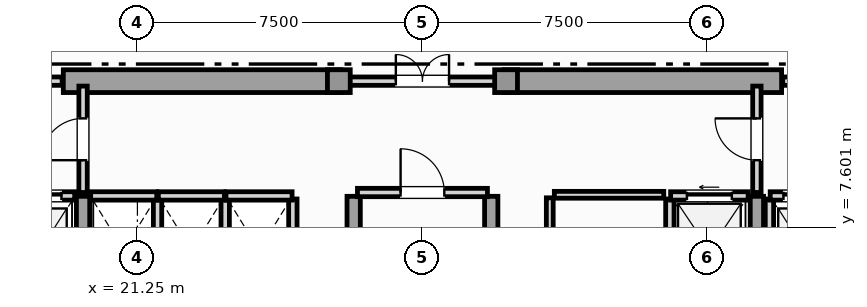
"""IFC4 building model, lengths in metres.
Left out: names, types, materials, properties, quantities, classifications, styles, units other than length and angle.
Written with IfcOpenShell. Run it as: python <this file> out.ifc"""

import sys

from ifc_helpers import new_model, si_unit, direction, frame, frame_2d, origin, origin_2d, place, context, subcontext, project, spatial, rectangle, extrude, element, fill, save


model = new_model("IFC4")
c1 = context("Model", 3, precision=1e-05, world=origin(), true_north=direction((0.0, 1.0)))
c2 = subcontext(c1, "Body", "Model", "MODEL_VIEW")
j1 = project(units=[si_unit("LENGTHUNIT", "METRE"), si_unit("PLANEANGLEUNIT", "RADIAN")], contexts=[c1])
p1 = place(None, origin())
s1 = spatial("IfcSite", under=j1, at=p1, CompositionType="ELEMENT")
p2 = place(p1, origin())
s2 = spatial("IfcBuilding", under=s1, at=p2, CompositionType="ELEMENT")
p3 = place(p2, frame((0.0, 0.0, 246.5)))
s3 = spatial("IfcBuildingStorey", under=s2, at=p3, CompositionType="ELEMENT", Elevation=246.5)
for number, where, z_axis, x_axis in (
    (1, (19.3, 11.45, 0.0), (0.0, 0.0, 1.0), (1.0, 0.0, 0.0)),
    (2, (30.9, 11.45, 0.0), (0.0, 0.0, 1.0), (1.0, 0.0, 0.0)),
):
    element("IfcWall", number, at=place(p3, frame(where, z_axis=z_axis, x_axis=x_axis)), inside=s3, PredefinedType="SHEAR", context=c2, shape_type="SweptSolid", body=[
        extrude(rectangle(XDim=7.3, YDim=0.6, at=frame_2d((3.65, 0.0))), origin(), (0.0, 0.0, 1.0), 4.92),
    ])
for number, where, z_axis, x_axis in (
    (3, (19.82, 0.92, 0.0), (0.0, 0.0, 1.0), (0.0, 1.0, 0.0)),
    (4, (26.94, 0.92, 0.0), (0.0, 0.0, 1.0), (0.0, 1.0, 0.0)),
    (5, (30.56, 0.92, 0.0), (0.0, 0.0, 1.0), (0.0, 1.0, 0.0)),
    (6, (37.55, 0.92, 0.0), (0.0, 0.0, 1.0), (0.0, 1.0, 0.0)),
):
    element("IfcWall", number, at=place(p3, frame(where, z_axis=z_axis, x_axis=x_axis)), inside=s3, PredefinedType="SHEAR", context=c2, shape_type="SweptSolid", body=[
        extrude(rectangle(XDim=7.5, YDim=0.35, at=frame_2d((3.75, 0.0))), origin(), (0.0, 0.0, 1.0), 4.92),
    ])
for number, where, z_axis, x_axis in (
    (7, (26.55, 11.45, 0.0), (0.0, 0.0, 1.0), (1.0, 0.0, 0.0)),
    (8, (30.95, 11.45, 0.0), (0.0, 0.0, 1.0), (1.0, 0.0, 0.0)),
):
    element("IfcColumn", number, at=place(p3, frame(where, z_axis=z_axis, x_axis=x_axis)), inside=s3, PredefinedType="COLUMN", context=c2, shape_type="SweptSolid", body=[
        extrude(rectangle(XDim=0.6, YDim=0.6, at=origin_2d()), origin(), (0.0, 0.0, 1.0), 5.2),
    ])
p4 = place(p3, frame((17.78, 8.43, 0.0), z_axis=(0.0, 0.0, 1.0), x_axis=(1.0, 0.0, 0.0)))
e9 = element("IfcWall", 9, at=p4, inside=s3, PredefinedType="SOLIDWALL", context=c2, shape_type="SweptSolid", body=[
    extrude(rectangle(XDim=1.82, YDim=0.22, at=frame_2d((0.91, 0.0))), origin(), (0.0, 0.0, 1.0), 4.92),
])
p5 = place(p4, frame((0.35, 0.0, 0.0)))
e10 = element("IfcOpeningElement", 10, at=p5, cuts=e9, PredefinedType="OPENING", context=c2, shape_type="SweptSolid", body=[
    extrude(rectangle(XDim=1.12, YDim=2.25, at=frame_2d((0.56, 1.125))), frame((0.0, 0.12, 0.0), z_axis=(0.0, -1.0, 0.0), x_axis=(1.0, 0.0, 0.0)), (0.0, 0.0, 1.0), 0.24),
])
p6 = place(p3, frame((37.88, 5.65, 0.0), z_axis=(0.0, 0.0, 1.0), x_axis=(0.0, 1.0, 0.0)))
e11 = element("IfcWall", 11, at=p6, inside=s3, PredefinedType="SOLIDWALL", context=c2, shape_type="SweptSolid", body=[
    extrude(rectangle(XDim=2.7, YDim=0.22, at=frame_2d((1.35, 0.0))), origin(), (0.0, 0.0, 1.0), 4.92),
])
p7 = place(p3, frame((37.9, 8.43, 0.0), z_axis=(0.0, 0.0, 1.0), x_axis=(1.0, 0.0, 0.0)))
e12 = element("IfcWall", 12, at=p7, inside=s3, PredefinedType="SOLIDWALL", context=c2, shape_type="SweptSolid", body=[
    extrude(rectangle(XDim=1.82, YDim=0.22, at=frame_2d((0.91, 0.0))), origin(), (0.0, 0.0, 1.0), 4.92),
])
p8 = place(p7, frame((0.35, 0.0, 0.0)))
e13 = element("IfcOpeningElement", 13, at=p8, cuts=e12, PredefinedType="OPENING", context=c2, shape_type="SweptSolid", body=[
    extrude(rectangle(XDim=1.12, YDim=2.25, at=frame_2d((0.56, 1.125))), frame((0.0, 0.12, 0.0), z_axis=(0.0, -1.0, 0.0), x_axis=(1.0, 0.0, 0.0)), (0.0, 0.0, 1.0), 0.24),
])
p9 = place(p3, frame((35.26, 5.65, 0.0), z_axis=(0.0, 0.0, 1.0), x_axis=(0.0, 1.0, 0.0)))
e14 = element("IfcWall", 14, at=p9, inside=s3, PredefinedType="SOLIDWALL", context=c2, shape_type="SweptSolid", body=[
    extrude(rectangle(XDim=2.7, YDim=0.22, at=frame_2d((1.35, 0.0))), origin(), (0.0, 0.0, 1.0), 4.92),
])
p10 = place(p3, frame((35.28, 8.43, 0.0), z_axis=(0.0, 0.0, 1.0), x_axis=(1.0, 0.0, 0.0)))
e15 = element("IfcWall", 15, at=p10, inside=s3, PredefinedType="SOLIDWALL", context=c2, shape_type="SweptSolid", body=[
    extrude(rectangle(XDim=2.04, YDim=0.22, at=frame_2d((1.02, 0.0))), origin(), (0.0, 0.0, 1.0), 4.92),
])
p11 = place(p10, frame((0.43, 0.0, 0.0)))
e16 = element("IfcOpeningElement", 16, at=p11, cuts=e15, PredefinedType="OPENING", context=c2, shape_type="SweptSolid", body=[
    extrude(rectangle(XDim=1.18, YDim=2.2, at=frame_2d((0.59, 1.1))), frame((0.0, 0.12, 0.0), z_axis=(0.0, -1.0, 0.0), x_axis=(1.0, 0.0, 0.0)), (0.0, 0.0, 1.0), 0.24),
])
p12 = place(p3, frame((21.78, 5.65, 0.0), z_axis=(0.0, 0.0, 1.0), x_axis=(0.0, 1.0, 0.0)))
e17 = element("IfcWall", 17, at=p12, inside=s3, PredefinedType="SOLIDWALL", context=c2, shape_type="SweptSolid", body=[
    extrude(rectangle(XDim=2.7, YDim=0.22, at=frame_2d((1.35, 0.0))), origin(), (0.0, 0.0, 1.0), 4.92),
])
p13 = place(p3, frame((20.02, 8.43, 0.0), z_axis=(0.0, 0.0, 1.0), x_axis=(1.0, 0.0, 0.0)))
e18 = element("IfcWall", 18, at=p13, inside=s3, PredefinedType="SOLIDWALL", context=c2, shape_type="SweptSolid", body=[
    extrude(rectangle(XDim=1.74, YDim=0.22, at=frame_2d((0.87, 0.0))), origin(), (0.0, 0.0, 1.0), 4.92),
])
p14 = place(p3, frame((23.56, 5.65, 0.0), z_axis=(0.0, 0.0, 1.0), x_axis=(0.0, 1.0, 0.0)))
e19 = element("IfcWall", 19, at=p14, inside=s3, PredefinedType="SOLIDWALL", context=c2, shape_type="SweptSolid", body=[
    extrude(rectangle(XDim=2.7, YDim=0.22, at=frame_2d((1.35, 0.0))), origin(), (0.0, 0.0, 1.0), 4.92),
])
p15 = place(p3, frame((21.8, 8.43, 0.0), z_axis=(0.0, 0.0, 1.0), x_axis=(1.0, 0.0, 0.0)))
e20 = element("IfcWall", 20, at=p15, inside=s3, PredefinedType="SOLIDWALL", context=c2, shape_type="SweptSolid", body=[
    extrude(rectangle(XDim=1.74, YDim=0.22, at=frame_2d((0.87, 0.0))), origin(), (0.0, 0.0, 1.0), 4.92),
])
p16 = place(p3, frame((25.34, 5.65, 0.0), z_axis=(0.0, 0.0, 1.0), x_axis=(0.0, 1.0, 0.0)))
e21 = element("IfcWall", 21, at=p16, inside=s3, PredefinedType="SOLIDWALL", context=c2, shape_type="SweptSolid", body=[
    extrude(rectangle(XDim=2.7, YDim=0.22, at=frame_2d((1.35, 0.0))), origin(), (0.0, 0.0, 1.0), 4.92),
])
p17 = place(p3, frame((23.58, 8.43, 0.0), z_axis=(0.0, 0.0, 1.0), x_axis=(1.0, 0.0, 0.0)))
e22 = element("IfcWall", 22, at=p17, inside=s3, PredefinedType="SOLIDWALL", context=c2, shape_type="SweptSolid", body=[
    extrude(rectangle(XDim=1.74, YDim=0.22, at=frame_2d((0.87, 0.0))), origin(), (0.0, 0.0, 1.0), 4.92),
])
p18 = place(p3, frame((27.04, 8.52, 0.0), z_axis=(0.0, 0.0, 1.0), x_axis=(1.0, 0.0, 0.0)))
e23 = element("IfcWall", 23, at=p18, inside=s3, PredefinedType="SOLIDWALL", context=c2, shape_type="SweptSolid", body=[
    extrude(rectangle(XDim=3.42, YDim=0.22, at=frame_2d((1.71, 0.0))), origin(), (0.0, 0.0, 1.0), 4.92),
])
p19 = place(p18, frame((1.135, 0.0, 0.0)))
e24 = element("IfcOpeningElement", 24, at=p19, cuts=e23, PredefinedType="OPENING", context=c2, shape_type="SweptSolid", body=[
    extrude(rectangle(XDim=1.15, YDim=2.2, at=frame_2d((0.575, 1.1))), frame((0.0, 0.12, 0.0), z_axis=(0.0, -1.0, 0.0), x_axis=(1.0, 0.0, 0.0)), (0.0, 0.0, 1.0), 0.24),
])
p20 = place(p3, frame((19.82, 8.52, 0.0), z_axis=(0.0, 0.0, 1.0), x_axis=(0.0, 1.0, 0.0)))
e25 = element("IfcWall", 25, at=p20, inside=s3, PredefinedType="SOLIDWALL", context=c2, shape_type="SweptSolid", body=[
    extrude(rectangle(XDim=2.8, YDim=0.22, at=frame_2d((1.4, 0.0))), origin(), (0.0, 0.0, 1.0), 4.375),
])
p21 = place(p20, frame((0.85, 0.0, 0.0)))
e26 = element("IfcOpeningElement", 26, at=p21, cuts=e25, PredefinedType="OPENING", context=c2, shape_type="SweptSolid", body=[
    extrude(rectangle(XDim=1.1, YDim=2.2, at=frame_2d((0.55, 1.1))), frame((0.0, 0.12, 0.0), z_axis=(0.0, -1.0, 0.0), x_axis=(1.0, 0.0, 0.0)), (0.0, 0.0, 1.0), 0.24),
])
p22 = place(p3, frame((37.55, 8.52, 0.0), z_axis=(0.0, 0.0, 1.0), x_axis=(0.0, 1.0, 0.0)))
e27 = element("IfcWall", 27, at=p22, inside=s3, PredefinedType="SOLIDWALL", context=c2, shape_type="SweptSolid", body=[
    extrude(rectangle(XDim=2.8, YDim=0.22, at=frame_2d((1.4, 0.0))), origin(), (0.0, 0.0, 1.0), 4.375),
])
p23 = place(p22, frame((0.85, 0.0, 0.0)))
e28 = element("IfcOpeningElement", 28, at=p23, cuts=e27, PredefinedType="OPENING", context=c2, shape_type="SweptSolid", body=[
    extrude(rectangle(XDim=1.1, YDim=2.2, at=frame_2d((0.55, 1.1))), frame((0.0, 0.12, 0.0), z_axis=(0.0, -1.0, 0.0), x_axis=(1.0, 0.0, 0.0)), (0.0, 0.0, 1.0), 0.24),
])
p24 = place(p3, frame((16.23, 11.45, 0.0), z_axis=(0.0, 0.0, 1.0), x_axis=(1.0, 0.0, 0.0)))
e29 = element("IfcWall", 29, at=p24, inside=s3, PredefinedType="SOLIDWALL", context=c2, shape_type="SweptSolid", body=[
    extrude(rectangle(XDim=3.04, YDim=0.22, at=frame_2d((1.52, 0.0))), origin(), (0.0, 0.0, 1.0), 4.92),
])
p25 = place(p24, frame((0.97, 0.0, 0.0)))
e30 = element("IfcOpeningElement", 30, at=p25, cuts=e29, PredefinedType="OPENING", context=c2, shape_type="SweptSolid", body=[
    extrude(rectangle(XDim=1.1, YDim=2.2, at=frame_2d((0.55, 1.1))), frame((0.0, 0.12, 0.0), z_axis=(0.0, -1.0, 0.0), x_axis=(1.0, 0.0, 0.0)), (0.0, 0.0, 1.0), 0.24),
])
p26 = place(p3, frame((26.63, 11.45, 0.0), z_axis=(0.0, 0.0, 1.0), x_axis=(1.0, 0.0, 0.0)))
e31 = element("IfcWall", 31, at=p26, inside=s3, PredefinedType="SOLIDWALL", context=c2, shape_type="SweptSolid", body=[
    extrude(rectangle(XDim=4.24, YDim=0.22, at=frame_2d((2.12, 0.0))), origin(), (0.0, 0.0, 1.0), 4.92),
])
p27 = place(p26, frame((1.42, 0.0, 0.0)))
e32 = element("IfcOpeningElement", 32, at=p27, cuts=e31, PredefinedType="OPENING", context=c2, shape_type="SweptSolid", body=[
    extrude(rectangle(XDim=1.4, YDim=2.2, at=frame_2d((0.7, 1.1))), frame((0.0, 0.12, 0.0), z_axis=(0.0, -1.0, 0.0), x_axis=(1.0, 0.0, 0.0)), (0.0, 0.0, 1.0), 0.24),
])
p28 = place(p3, frame((38.23, 11.45, 0.0), z_axis=(0.0, 0.0, 1.0), x_axis=(1.0, 0.0, 0.0)))
e33 = element("IfcWall", 33, at=p28, inside=s3, PredefinedType="SOLIDWALL", context=c2, shape_type="SweptSolid", body=[
    extrude(rectangle(XDim=3.04, YDim=0.22, at=frame_2d((1.52, 0.0))), origin(), (0.0, 0.0, 1.0), 4.92),
])
p29 = place(p28, frame((0.97, 0.0, 0.0)))
e34 = element("IfcOpeningElement", 34, at=p29, cuts=e33, PredefinedType="OPENING", context=c2, shape_type="SweptSolid", body=[
    extrude(rectangle(XDim=1.1, YDim=2.2, at=frame_2d((0.55, 1.1))), frame((0.0, 0.12, 0.0), z_axis=(0.0, -1.0, 0.0), x_axis=(1.0, 0.0, 0.0)), (0.0, 0.0, 1.0), 0.24),
])
p30 = place(p3, frame((32.1, 5.65, 0.0), z_axis=(0.0, 0.0, 1.0), x_axis=(0.0, 1.0, 0.0)))
e35 = element("IfcWall", 35, at=p30, inside=s3, PredefinedType="PARTITIONING", context=c2, shape_type="SweptSolid", body=[
    extrude(rectangle(XDim=2.73, YDim=0.18, at=frame_2d((1.365, 0.0))), origin(), (0.0, 0.0, 1.0), 4.92),
])
p31 = place(p30, frame((0.84, 0.0, 0.0)))
e36 = element("IfcOpeningElement", 36, at=p31, cuts=e35, PredefinedType="OPENING", context=c2, shape_type="SweptSolid", body=[
    extrude(rectangle(XDim=1.05, YDim=2.15, at=frame_2d((0.525, 1.075))), frame((0.0, 0.1, 0.0), z_axis=(0.0, -1.0, 0.0), x_axis=(1.0, 0.0, 0.0)), (0.0, 0.0, 1.0), 0.2),
])
p32 = place(p3, frame((32.22, 8.46, 0.0), z_axis=(0.0, 0.0, 1.0), x_axis=(1.0, 0.0, 0.0)))
e37 = element("IfcWall", 37, at=p32, inside=s3, PredefinedType="PARTITIONING", context=c2, shape_type="SweptSolid", body=[
    extrude(rectangle(XDim=2.88, YDim=0.18, at=frame_2d((1.44, 0.0))), origin(), (0.0, 0.0, 1.0), 4.92),
])
p33 = place(p5, origin())
e38 = element("IfcDoor", 38, at=p33, inside=s3, OperationType="SLIDING_TO_LEFT", PredefinedType="DOOR", context=c2, shape_type="SweptSolid", body=[
    extrude(rectangle(XDim=1.12, YDim=2.25, at=frame_2d((0.56, 1.125))), frame((0.0, 0.025, 0.0), z_axis=(0.0, -1.0, 0.0), x_axis=(1.0, 0.0, 0.0)), (0.0, 0.0, 1.0), 0.05),
])
fill(e10, e38)
p34 = place(p8, origin())
e39 = element("IfcDoor", 39, at=p34, inside=s3, OperationType="SLIDING_TO_RIGHT", PredefinedType="DOOR", context=c2, shape_type="SweptSolid", body=[
    extrude(rectangle(XDim=1.12, YDim=2.25, at=frame_2d((0.56, 1.125))), frame((0.0, 0.025, 0.0), z_axis=(0.0, -1.0, 0.0), x_axis=(1.0, 0.0, 0.0)), (0.0, 0.0, 1.0), 0.05),
])
fill(e13, e39)
p35 = place(p11, origin())
e40 = element("IfcDoor", 40, at=p35, inside=s3, OperationType="SLIDING_TO_LEFT", PredefinedType="DOOR", context=c2, shape_type="SweptSolid", body=[
    extrude(rectangle(XDim=1.18, YDim=2.2, at=frame_2d((0.59, 1.1))), frame((0.0, 0.025, 0.0), z_axis=(0.0, -1.0, 0.0), x_axis=(1.0, 0.0, 0.0)), (0.0, 0.0, 1.0), 0.05),
])
fill(e16, e40)
p36 = place(p19, origin())
e41 = element("IfcDoor", 41, at=p36, inside=s3, OperationType="SINGLE_SWING_LEFT", PredefinedType="DOOR", context=c2, shape_type="SweptSolid", body=[
    extrude(rectangle(XDim=1.15, YDim=2.2, at=frame_2d((0.575, 1.1))), frame((0.0, 0.025, 0.0), z_axis=(0.0, -1.0, 0.0), x_axis=(1.0, 0.0, 0.0)), (0.0, 0.0, 1.0), 0.05),
])
fill(e24, e41)
p37 = place(p21, origin())
e42 = element("IfcDoor", 42, at=p37, inside=s3, OperationType="SINGLE_SWING_LEFT", PredefinedType="DOOR", context=c2, shape_type="SweptSolid", body=[
    extrude(rectangle(XDim=1.1, YDim=2.2, at=frame_2d((0.55, 1.1))), frame((0.0, 0.025, 0.0), z_axis=(0.0, -1.0, 0.0), x_axis=(1.0, 0.0, 0.0)), (0.0, 0.0, 1.0), 0.05),
])
fill(e26, e42)
p38 = place(p23, origin())
e43 = element("IfcDoor", 43, at=p38, inside=s3, OperationType="SINGLE_SWING_RIGHT", PredefinedType="DOOR", context=c2, shape_type="SweptSolid", body=[
    extrude(rectangle(XDim=1.1, YDim=2.2, at=frame_2d((0.55, 1.1))), frame((0.0, 0.025, 0.0), z_axis=(0.0, -1.0, 0.0), x_axis=(1.0, 0.0, 0.0)), (0.0, 0.0, 1.0), 0.05),
])
fill(e28, e43)
p39 = place(p27, origin())
e44 = element("IfcDoor", 44, at=p39, inside=s3, OperationType="DOUBLE_DOOR_SINGLE_SWING", PredefinedType="DOOR", context=c2, shape_type="SweptSolid", body=[
    extrude(rectangle(XDim=1.4, YDim=2.2, at=frame_2d((0.7, 1.1))), frame((0.0, 0.025, 0.0), z_axis=(0.0, -1.0, 0.0), x_axis=(1.0, 0.0, 0.0)), (0.0, 0.0, 1.0), 0.05),
])
fill(e32, e44)
save(model, sys.argv[1])
